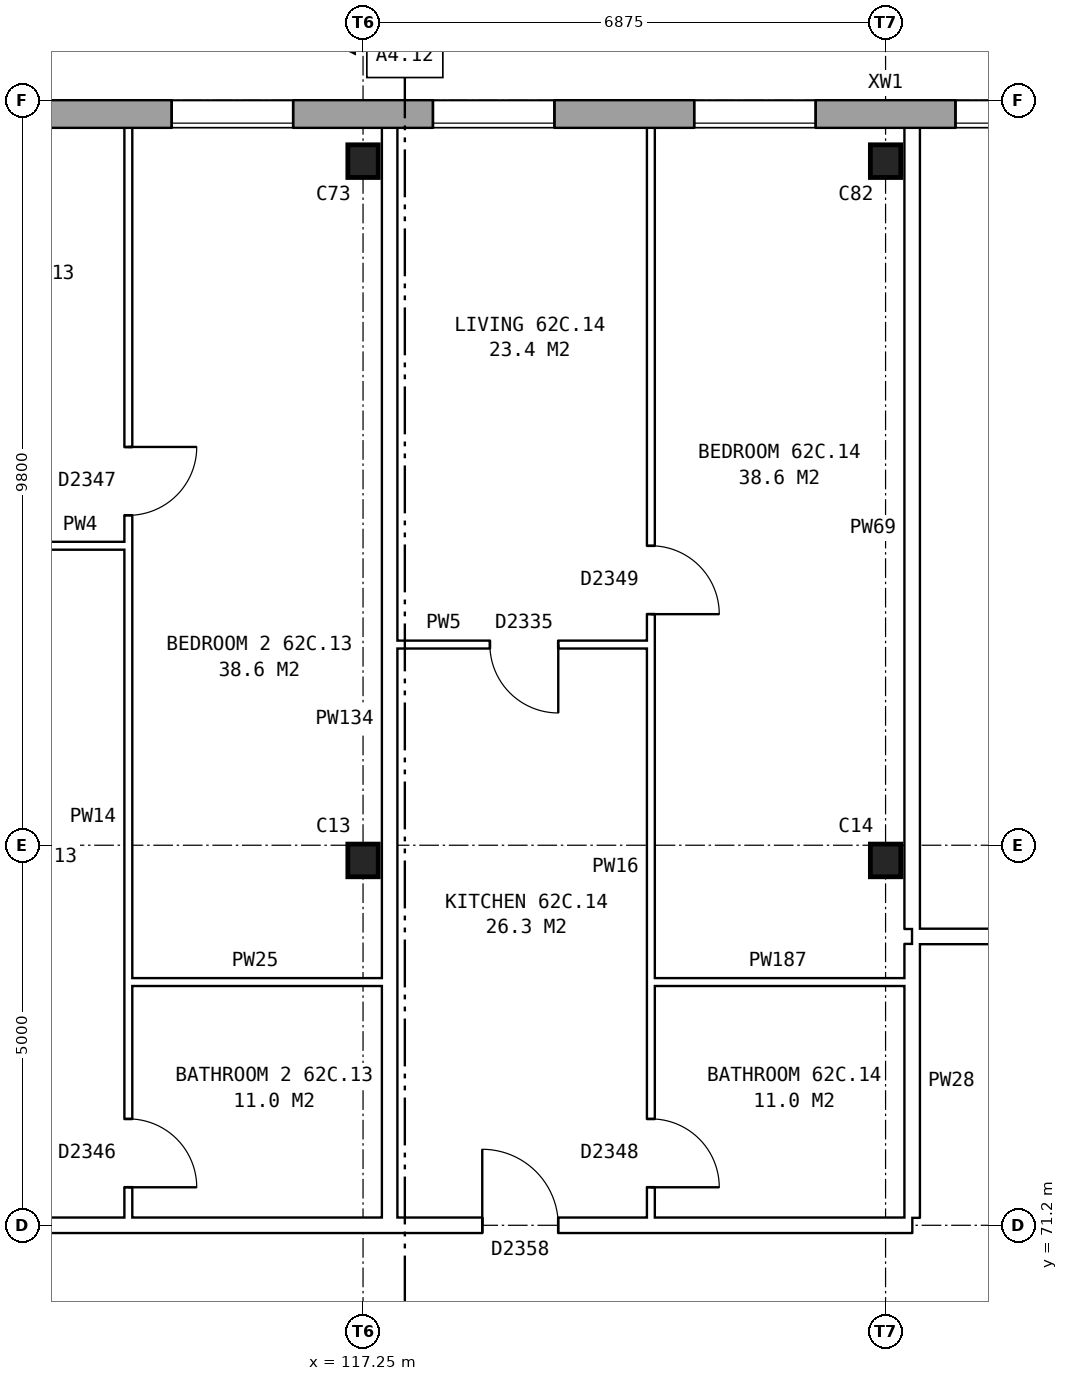
"""IFC4 building model, lengths in metres.
Left out: names, types, materials, properties, quantities, classifications, styles, units other than length and angle.
Written with IfcOpenShell. Run it as: python <this file> out.ifc"""

import sys

from ifc_helpers import new_model, si_unit, direction, frame, frame_2d, origin, origin_2d, place, context, subcontext, project, spatial, rectangle, i_section, extrude, element, fill, save


model = new_model("IFC4")
c1 = context("Model", 3, precision=1e-05, world=origin(), true_north=direction((0.0, 1.0)))
c2 = subcontext(c1, "Body", "Model", "MODEL_VIEW")
j1 = project(units=[si_unit("LENGTHUNIT", "METRE"), si_unit("PLANEANGLEUNIT", "RADIAN")], contexts=[c1])
p1 = place(None, origin())
s1 = spatial("IfcSite", under=j1, at=p1, CompositionType="ELEMENT")
p2 = place(p1, origin())
s2 = spatial("IfcBuilding", under=s1, at=p2, CompositionType="ELEMENT")
p3 = place(p2, frame((0.0, 0.0, 221.4)))
s3 = spatial("IfcBuildingStorey", under=s2, at=p3, CompositionType="ELEMENT", Elevation=221.4)
for number, where, z_axis, x_axis in (
    (1, (117.25, 76.0, 0.0), (0.0, 0.0, 1.0), (1.0, 0.0, 0.0)),
    (2, (124.125, 76.0, 0.0), (0.0, 0.0, 1.0), (1.0, 0.0, 0.0)),
    (3, (117.25, 85.2, 0.0), (0.0, 0.0, 1.0), (1.0, 0.0, 0.0)),
    (4, (124.125, 85.2, 0.0), (0.0, 0.0, 1.0), (1.0, 0.0, 0.0)),
):
    element("IfcColumn", number, at=place(p3, frame(where, z_axis=z_axis, x_axis=x_axis)), inside=s3, PredefinedType="COLUMN", context=c2, shape_type="SweptSolid", body=[
        extrude(i_section(OverallWidth=0.4, OverallDepth=0.43, WebThickness=0.04, FlangeThickness=0.04, at=origin_2d()), origin(), (0.0, 0.0, 1.0), 2.85),
    ])
p4 = place(p3, frame((131.05, 85.82, 0.0), z_axis=(0.0, 0.0, 1.0), x_axis=(-1.0, 0.0, 0.0)))
e5 = element("IfcWall", 5, at=p4, inside=s3, PredefinedType="STANDARD", context=c2, shape_type="SweptSolid", body=[
    extrude(rectangle(XDim=55.1, YDim=0.36, at=frame_2d((27.55, 0.0))), origin(), (0.0, 0.0, 1.0), 2.85),
])
p5 = place(p4, frame((0.969, 0.0, 0.8)))
e6 = element("IfcOpeningElement", 6, at=p5, cuts=e5, PredefinedType="OPENING", context=c2, shape_type="SweptSolid", body=[
    extrude(rectangle(XDim=1.6, YDim=1.8, at=frame_2d((0.8, 0.9))), frame((0.0, 0.19, 0.0), z_axis=(0.0, -1.0, 0.0), x_axis=(1.0, 0.0, 0.0)), (0.0, 0.0, 1.0), 0.38),
])
p6 = place(p4, frame((4.406, 0.0, 0.8)))
e7 = element("IfcOpeningElement", 7, at=p6, cuts=e5, PredefinedType="OPENING", context=c2, shape_type="SweptSolid", body=[
    extrude(rectangle(XDim=1.6, YDim=1.8, at=frame_2d((0.8, 0.9))), frame((0.0, 0.19, 0.0), z_axis=(0.0, -1.0, 0.0), x_axis=(1.0, 0.0, 0.0)), (0.0, 0.0, 1.0), 0.38),
])
p7 = place(p4, frame((7.844, 0.0, 0.8)))
e8 = element("IfcOpeningElement", 8, at=p7, cuts=e5, PredefinedType="OPENING", context=c2, shape_type="SweptSolid", body=[
    extrude(rectangle(XDim=1.6, YDim=1.8, at=frame_2d((0.8, 0.9))), frame((0.0, 0.19, 0.0), z_axis=(0.0, -1.0, 0.0), x_axis=(1.0, 0.0, 0.0)), (0.0, 0.0, 1.0), 0.38),
])
p8 = place(p4, frame((11.281, 0.0, 0.8)))
e9 = element("IfcOpeningElement", 9, at=p8, cuts=e5, PredefinedType="OPENING", context=c2, shape_type="SweptSolid", body=[
    extrude(rectangle(XDim=1.6, YDim=1.8, at=frame_2d((0.8, 0.9))), frame((0.0, 0.19, 0.0), z_axis=(0.0, -1.0, 0.0), x_axis=(1.0, 0.0, 0.0)), (0.0, 0.0, 1.0), 0.38),
])
p9 = place(p4, frame((14.719, 0.0, 0.8)))
e10 = element("IfcOpeningElement", 10, at=p9, cuts=e5, PredefinedType="OPENING", context=c2, shape_type="SweptSolid", body=[
    extrude(rectangle(XDim=1.6, YDim=1.8, at=frame_2d((0.8, 0.9))), frame((0.0, 0.19, 0.0), z_axis=(0.0, -1.0, 0.0), x_axis=(1.0, 0.0, 0.0)), (0.0, 0.0, 1.0), 0.38),
])
p10 = place(p4, frame((18.156, 0.0, 0.8)))
e11 = element("IfcOpeningElement", 11, at=p10, cuts=e5, PredefinedType="OPENING", context=c2, shape_type="SweptSolid", body=[
    extrude(rectangle(XDim=1.6, YDim=1.8, at=frame_2d((0.8, 0.9))), frame((0.0, 0.19, 0.0), z_axis=(0.0, -1.0, 0.0), x_axis=(1.0, 0.0, 0.0)), (0.0, 0.0, 1.0), 0.38),
])
p11 = place(p4, frame((21.594, 0.0, 0.8)))
e12 = element("IfcOpeningElement", 12, at=p11, cuts=e5, PredefinedType="OPENING", context=c2, shape_type="SweptSolid", body=[
    extrude(rectangle(XDim=1.6, YDim=1.8, at=frame_2d((0.8, 0.9))), frame((0.0, 0.19, 0.0), z_axis=(0.0, -1.0, 0.0), x_axis=(1.0, 0.0, 0.0)), (0.0, 0.0, 1.0), 0.38),
])
p12 = place(p4, frame((25.031, 0.0, 0.8)))
e13 = element("IfcOpeningElement", 13, at=p12, cuts=e5, PredefinedType="OPENING", context=c2, shape_type="SweptSolid", body=[
    extrude(rectangle(XDim=1.6, YDim=1.8, at=frame_2d((0.8, 0.9))), frame((0.0, 0.19, 0.0), z_axis=(0.0, -1.0, 0.0), x_axis=(1.0, 0.0, 0.0)), (0.0, 0.0, 1.0), 0.38),
])
p13 = place(p4, frame((28.469, 0.0, 0.8)))
e14 = element("IfcOpeningElement", 14, at=p13, cuts=e5, PredefinedType="OPENING", context=c2, shape_type="SweptSolid", body=[
    extrude(rectangle(XDim=1.6, YDim=1.8, at=frame_2d((0.8, 0.9))), frame((0.0, 0.19, 0.0), z_axis=(0.0, -1.0, 0.0), x_axis=(1.0, 0.0, 0.0)), (0.0, 0.0, 1.0), 0.38),
])
p14 = place(p4, frame((31.906, 0.0, 0.8)))
e15 = element("IfcOpeningElement", 15, at=p14, cuts=e5, PredefinedType="OPENING", context=c2, shape_type="SweptSolid", body=[
    extrude(rectangle(XDim=1.6, YDim=1.8, at=frame_2d((0.8, 0.9))), frame((0.0, 0.19, 0.0), z_axis=(0.0, -1.0, 0.0), x_axis=(1.0, 0.0, 0.0)), (0.0, 0.0, 1.0), 0.38),
])
p15 = place(p4, frame((35.344, 0.0, 0.8)))
e16 = element("IfcOpeningElement", 16, at=p15, cuts=e5, PredefinedType="OPENING", context=c2, shape_type="SweptSolid", body=[
    extrude(rectangle(XDim=1.6, YDim=1.8, at=frame_2d((0.8, 0.9))), frame((0.0, 0.19, 0.0), z_axis=(0.0, -1.0, 0.0), x_axis=(1.0, 0.0, 0.0)), (0.0, 0.0, 1.0), 0.38),
])
p16 = place(p4, frame((38.781, 0.0, 0.8)))
e17 = element("IfcOpeningElement", 17, at=p16, cuts=e5, PredefinedType="OPENING", context=c2, shape_type="SweptSolid", body=[
    extrude(rectangle(XDim=1.6, YDim=1.8, at=frame_2d((0.8, 0.9))), frame((0.0, 0.19, 0.0), z_axis=(0.0, -1.0, 0.0), x_axis=(1.0, 0.0, 0.0)), (0.0, 0.0, 1.0), 0.38),
])
p17 = place(p4, frame((42.219, 0.0, 0.8)))
e18 = element("IfcOpeningElement", 18, at=p17, cuts=e5, PredefinedType="OPENING", context=c2, shape_type="SweptSolid", body=[
    extrude(rectangle(XDim=1.6, YDim=1.8, at=frame_2d((0.8, 0.9))), frame((0.0, 0.19, 0.0), z_axis=(0.0, -1.0, 0.0), x_axis=(1.0, 0.0, 0.0)), (0.0, 0.0, 1.0), 0.38),
])
p18 = place(p4, frame((45.656, 0.0, 0.8)))
e19 = element("IfcOpeningElement", 19, at=p18, cuts=e5, PredefinedType="OPENING", context=c2, shape_type="SweptSolid", body=[
    extrude(rectangle(XDim=1.6, YDim=1.8, at=frame_2d((0.8, 0.9))), frame((0.0, 0.19, 0.0), z_axis=(0.0, -1.0, 0.0), x_axis=(1.0, 0.0, 0.0)), (0.0, 0.0, 1.0), 0.38),
])
p19 = place(p4, frame((49.094, 0.0, 0.8)))
e20 = element("IfcOpeningElement", 20, at=p19, cuts=e5, PredefinedType="OPENING", context=c2, shape_type="SweptSolid", body=[
    extrude(rectangle(XDim=1.6, YDim=1.8, at=frame_2d((0.8, 0.9))), frame((0.0, 0.19, 0.0), z_axis=(0.0, -1.0, 0.0), x_axis=(1.0, 0.0, 0.0)), (0.0, 0.0, 1.0), 0.38),
])
p20 = place(p4, frame((52.531, 0.0, 0.8)))
e21 = element("IfcOpeningElement", 21, at=p20, cuts=e5, PredefinedType="OPENING", context=c2, shape_type="SweptSolid", body=[
    extrude(rectangle(XDim=1.6, YDim=1.8, at=frame_2d((0.8, 0.9))), frame((0.0, 0.19, 0.0), z_axis=(0.0, -1.0, 0.0), x_axis=(1.0, 0.0, 0.0)), (0.0, 0.0, 1.0), 0.38),
])
p21 = place(p3, frame((83.225, 71.2, 0.0), z_axis=(0.0, 0.0, 1.0), x_axis=(1.0, 0.0, 0.0)))
e22 = element("IfcWall", 22, at=p21, inside=s3, PredefinedType="PARTITIONING", context=c2, shape_type="SweptSolid", body=[
    extrude(rectangle(XDim=41.25, YDim=0.2, at=frame_2d((20.625, 0.0))), origin(), (0.0, 0.0, 1.0), 2.85),
])
p22 = place(p21, frame((4.656, 0.0, 0.0)))
e23 = element("IfcOpeningElement", 23, at=p22, cuts=e22, PredefinedType="OPENING", context=c2, shape_type="SweptSolid", body=[
    extrude(rectangle(XDim=1.0, YDim=2.1, at=frame_2d((0.5, 1.05))), frame((0.0, 0.11, 0.0), z_axis=(0.0, -1.0, 0.0), x_axis=(1.0, 0.0, 0.0)), (0.0, 0.0, 1.0), 0.22),
])
p23 = place(p21, frame((11.531, 0.0, 0.0)))
e24 = element("IfcOpeningElement", 24, at=p23, cuts=e22, PredefinedType="OPENING", context=c2, shape_type="SweptSolid", body=[
    extrude(rectangle(XDim=1.0, YDim=2.1, at=frame_2d((0.5, 1.05))), frame((0.0, 0.11, 0.0), z_axis=(0.0, -1.0, 0.0), x_axis=(1.0, 0.0, 0.0)), (0.0, 0.0, 1.0), 0.22),
])
p24 = place(p21, frame((18.406, 0.0, 0.0)))
e25 = element("IfcOpeningElement", 25, at=p24, cuts=e22, PredefinedType="OPENING", context=c2, shape_type="SweptSolid", body=[
    extrude(rectangle(XDim=1.0, YDim=2.1, at=frame_2d((0.5, 1.05))), frame((0.0, 0.11, 0.0), z_axis=(0.0, -1.0, 0.0), x_axis=(1.0, 0.0, 0.0)), (0.0, 0.0, 1.0), 0.22),
])
p25 = place(p21, frame((28.719, 0.0, 0.0)))
e26 = element("IfcOpeningElement", 26, at=p25, cuts=e22, PredefinedType="OPENING", context=c2, shape_type="SweptSolid", body=[
    extrude(rectangle(XDim=1.0, YDim=2.1, at=frame_2d((0.5, 1.05))), frame((0.0, 0.11, 0.0), z_axis=(0.0, -1.0, 0.0), x_axis=(1.0, 0.0, 0.0)), (0.0, 0.0, 1.0), 0.22),
])
p26 = place(p21, frame((35.594, 0.0, 0.0)))
e27 = element("IfcOpeningElement", 27, at=p26, cuts=e22, PredefinedType="OPENING", context=c2, shape_type="SweptSolid", body=[
    extrude(rectangle(XDim=1.0, YDim=2.1, at=frame_2d((0.5, 1.05))), frame((0.0, 0.11, 0.0), z_axis=(0.0, -1.0, 0.0), x_axis=(1.0, 0.0, 0.0)), (0.0, 0.0, 1.0), 0.22),
])
for number, where, z_axis, x_axis in (
    (28, (114.162, 74.4, 0.0), (0.0, 0.0, 1.0), (1.0, 0.0, 0.0)),
    (29, (121.037, 74.4, 0.0), (0.0, 0.0, 1.0), (1.0, 0.0, 0.0)),
):
    element("IfcWall", number, at=place(p3, frame(where, z_axis=z_axis, x_axis=x_axis)), inside=s3, PredefinedType="PARTITIONING", context=c2, shape_type="SweptSolid", body=[
        extrude(rectangle(XDim=3.338, YDim=0.1, at=frame_2d((1.669, 0.0))), origin(), (0.0, 0.0, 1.0), 2.85),
    ])
p27 = place(p3, frame((124.475, 75.0, 0.0), z_axis=(0.0, 0.0, 1.0), x_axis=(1.0, 0.0, 0.0)))
e30 = element("IfcWall", 30, at=p27, inside=s3, PredefinedType="PARTITIONING", context=c2, shape_type="SweptSolid", body=[
    extrude(rectangle(XDim=6.885, YDim=0.2, at=frame_2d((3.442, 0.0))), origin(), (0.0, 0.0, 1.0), 2.85),
])
p28 = place(p27, frame((2.992, 0.0, 0.0)))
e31 = element("IfcOpeningElement", 31, at=p28, cuts=e30, PredefinedType="OPENING", context=c2, shape_type="SweptSolid", body=[
    extrude(rectangle(XDim=0.9, YDim=2.1, at=frame_2d((0.45, 1.05))), frame((0.0, 0.11, 0.0), z_axis=(0.0, -1.0, 0.0), x_axis=(1.0, 0.0, 0.0)), (0.0, 0.0, 1.0), 0.22),
])
p29 = place(p3, frame((117.7, 78.84, 0.0), z_axis=(0.0, 0.0, 1.0), x_axis=(1.0, 0.0, 0.0)))
e32 = element("IfcWall", 32, at=p29, inside=s3, PredefinedType="PARTITIONING", context=c2, shape_type="SweptSolid", body=[
    extrude(rectangle(XDim=3.337, YDim=0.1, at=frame_2d((1.668, 0.0))), origin(), (0.0, 0.0, 1.0), 2.85),
])
p30 = place(p29, frame((1.219, 0.0, 0.0)))
e33 = element("IfcOpeningElement", 33, at=p30, cuts=e32, PredefinedType="OPENING", context=c2, shape_type="SweptSolid", body=[
    extrude(rectangle(XDim=0.9, YDim=2.1, at=frame_2d((0.45, 1.05))), frame((0.0, 0.06, 0.0), z_axis=(0.0, -1.0, 0.0), x_axis=(1.0, 0.0, 0.0)), (0.0, 0.0, 1.0), 0.12),
])
p31 = place(p3, frame((110.725, 80.14, 0.0), z_axis=(0.0, 0.0, 1.0), x_axis=(1.0, 0.0, 0.0)))
e34 = element("IfcWall", 34, at=p31, inside=s3, PredefinedType="PARTITIONING", context=c2, shape_type="SweptSolid", body=[
    extrude(rectangle(XDim=3.437, YDim=0.1, at=frame_2d((1.719, 0.0))), origin(), (0.0, 0.0, 1.0), 2.85),
])
p32 = place(p31, frame((1.269, 0.0, 0.0)))
e35 = element("IfcOpeningElement", 35, at=p32, cuts=e34, PredefinedType="OPENING", context=c2, shape_type="SweptSolid", body=[
    extrude(rectangle(XDim=0.9, YDim=2.1, at=frame_2d((0.45, 1.05))), frame((0.0, 0.06, 0.0), z_axis=(0.0, -1.0, 0.0), x_axis=(1.0, 0.0, 0.0)), (0.0, 0.0, 1.0), 0.12),
])
p33 = place(p3, frame((114.162, 71.3, 0.0), z_axis=(0.0, 0.0, 1.0), x_axis=(0.0, 1.0, 0.0)))
e36 = element("IfcWall", 36, at=p33, inside=s3, PredefinedType="PARTITIONING", context=c2, shape_type="SweptSolid", body=[
    extrude(rectangle(XDim=14.34, YDim=0.1, at=frame_2d((7.17, 0.0))), origin(), (0.0, 0.0, 1.0), 2.85),
])
p34 = place(p33, frame((9.24, 0.0, 0.0)))
e37 = element("IfcOpeningElement", 37, at=p34, cuts=e36, PredefinedType="OPENING", context=c2, shape_type="SweptSolid", body=[
    extrude(rectangle(XDim=0.9, YDim=2.1, at=frame_2d((0.45, 1.05))), frame((0.0, 0.06, 0.0), z_axis=(0.0, -1.0, 0.0), x_axis=(1.0, 0.0, 0.0)), (0.0, 0.0, 1.0), 0.12),
])
p35 = place(p33, frame((0.4, 0.0, 0.0)))
e38 = element("IfcOpeningElement", 38, at=p35, cuts=e36, PredefinedType="OPENING", context=c2, shape_type="SweptSolid", body=[
    extrude(rectangle(XDim=0.9, YDim=2.1, at=frame_2d((0.45, 1.05))), frame((0.0, 0.06, 0.0), z_axis=(0.0, -1.0, 0.0), x_axis=(1.0, 0.0, 0.0)), (0.0, 0.0, 1.0), 0.12),
])
p36 = place(p3, frame((117.6, 71.3, 0.0), z_axis=(0.0, 0.0, 1.0), x_axis=(0.0, 1.0, 0.0)))
e39 = element("IfcWall", 39, at=p36, inside=s3, PredefinedType="PARTITIONING", context=c2, shape_type="SweptSolid", body=[
    extrude(rectangle(XDim=14.34, YDim=0.2, at=frame_2d((7.17, 0.0))), origin(), (0.0, 0.0, 1.0), 2.85),
])
p37 = place(p3, frame((121.037, 71.3, 0.0), z_axis=(0.0, 0.0, 1.0), x_axis=(0.0, 1.0, 0.0)))
e40 = element("IfcWall", 40, at=p37, inside=s3, PredefinedType="PARTITIONING", context=c2, shape_type="SweptSolid", body=[
    extrude(rectangle(XDim=14.34, YDim=0.1, at=frame_2d((7.17, 0.0))), origin(), (0.0, 0.0, 1.0), 2.85),
])
p38 = place(p37, frame((7.94, 0.0, 0.0)))
e41 = element("IfcOpeningElement", 41, at=p38, cuts=e40, PredefinedType="OPENING", context=c2, shape_type="SweptSolid", body=[
    extrude(rectangle(XDim=0.9, YDim=2.1, at=frame_2d((0.45, 1.05))), frame((0.0, 0.06, 0.0), z_axis=(0.0, -1.0, 0.0), x_axis=(1.0, 0.0, 0.0)), (0.0, 0.0, 1.0), 0.12),
])
p39 = place(p37, frame((0.4, 0.0, 0.0)))
e42 = element("IfcOpeningElement", 42, at=p39, cuts=e40, PredefinedType="OPENING", context=c2, shape_type="SweptSolid", body=[
    extrude(rectangle(XDim=0.9, YDim=2.1, at=frame_2d((0.45, 1.05))), frame((0.0, 0.06, 0.0), z_axis=(0.0, -1.0, 0.0), x_axis=(1.0, 0.0, 0.0)), (0.0, 0.0, 1.0), 0.12),
])
p40 = place(p3, frame((124.475, 71.3, 0.0), z_axis=(0.0, 0.0, 1.0), x_axis=(0.0, 1.0, 0.0)))
e43 = element("IfcWall", 43, at=p40, inside=s3, PredefinedType="PARTITIONING", context=c2, shape_type="SweptSolid", body=[
    extrude(rectangle(XDim=3.6, YDim=0.2, at=frame_2d((1.8, 0.0))), origin(), (0.0, 0.0, 1.0), 2.85),
])
p41 = place(p3, frame((124.475, 75.1, 0.0), z_axis=(0.0, 0.0, 1.0), x_axis=(0.0, 1.0, 0.0)))
e44 = element("IfcWall", 44, at=p41, inside=s3, PredefinedType="PARTITIONING", context=c2, shape_type="SweptSolid", body=[
    extrude(rectangle(XDim=10.54, YDim=0.2, at=frame_2d((5.27, 0.0))), origin(), (0.0, 0.0, 1.0), 2.85),
])
p42 = place(p6, origin())
e45 = element("IfcWindow", 45, at=p42, inside=s3, PartitioningType="SINGLE_PANEL", PredefinedType="WINDOW", context=c2, shape_type="SweptSolid", body=[
    extrude(rectangle(XDim=1.6, YDim=1.8, at=frame_2d((0.8, 0.9))), frame((0.0, 0.15, 0.0), z_axis=(0.0, -1.0, 0.0), x_axis=(1.0, 0.0, 0.0)), (0.0, 0.0, 1.0), 0.06),
])
fill(e7, e45)
p43 = place(p7, origin())
e46 = element("IfcWindow", 46, at=p43, inside=s3, PartitioningType="SINGLE_PANEL", PredefinedType="WINDOW", context=c2, shape_type="SweptSolid", body=[
    extrude(rectangle(XDim=1.6, YDim=1.8, at=frame_2d((0.8, 0.9))), frame((0.0, 0.15, 0.0), z_axis=(0.0, -1.0, 0.0), x_axis=(1.0, 0.0, 0.0)), (0.0, 0.0, 1.0), 0.06),
])
fill(e8, e46)
p44 = place(p8, origin())
e47 = element("IfcWindow", 47, at=p44, inside=s3, PartitioningType="SINGLE_PANEL", PredefinedType="WINDOW", context=c2, shape_type="SweptSolid", body=[
    extrude(rectangle(XDim=1.6, YDim=1.8, at=frame_2d((0.8, 0.9))), frame((0.0, 0.15, 0.0), z_axis=(0.0, -1.0, 0.0), x_axis=(1.0, 0.0, 0.0)), (0.0, 0.0, 1.0), 0.06),
])
fill(e9, e47)
p45 = place(p9, origin())
e48 = element("IfcWindow", 48, at=p45, inside=s3, PartitioningType="SINGLE_PANEL", PredefinedType="WINDOW", context=c2, shape_type="SweptSolid", body=[
    extrude(rectangle(XDim=1.6, YDim=1.8, at=frame_2d((0.8, 0.9))), frame((0.0, 0.15, 0.0), z_axis=(0.0, -1.0, 0.0), x_axis=(1.0, 0.0, 0.0)), (0.0, 0.0, 1.0), 0.06),
])
fill(e10, e48)
p46 = place(p34, frame((0.9, 0.0, 0.0), z_axis=(0.0, 0.0, 1.0), x_axis=(-1.0, 0.0, 0.0)))
e49 = element("IfcDoor", 49, at=p46, inside=s3, OperationType="SINGLE_SWING_LEFT", PredefinedType="DOOR", context=c2, shape_type="SweptSolid", body=[
    extrude(rectangle(XDim=0.9, YDim=2.1, at=frame_2d((0.45, 1.05))), frame((0.0, 0.025, 0.0), z_axis=(0.0, -1.0, 0.0), x_axis=(1.0, 0.0, 0.0)), (0.0, 0.0, 1.0), 0.05),
])
fill(e37, e49)
p47 = place(p35, frame((0.9, 0.0, 0.0), z_axis=(0.0, 0.0, 1.0), x_axis=(-1.0, 0.0, 0.0)))
e50 = element("IfcDoor", 50, at=p47, inside=s3, OperationType="SINGLE_SWING_RIGHT", PredefinedType="DOOR", context=c2, shape_type="SweptSolid", body=[
    extrude(rectangle(XDim=0.9, YDim=2.1, at=frame_2d((0.45, 1.05))), frame((0.0, 0.025, 0.0), z_axis=(0.0, -1.0, 0.0), x_axis=(1.0, 0.0, 0.0)), (0.0, 0.0, 1.0), 0.05),
])
fill(e38, e50)
p48 = place(p38, frame((0.9, 0.0, 0.0), z_axis=(0.0, 0.0, 1.0), x_axis=(-1.0, 0.0, 0.0)))
e51 = element("IfcDoor", 51, at=p48, inside=s3, OperationType="SINGLE_SWING_RIGHT", PredefinedType="DOOR", context=c2, shape_type="SweptSolid", body=[
    extrude(rectangle(XDim=0.9, YDim=2.1, at=frame_2d((0.45, 1.05))), frame((0.0, 0.025, 0.0), z_axis=(0.0, -1.0, 0.0), x_axis=(1.0, 0.0, 0.0)), (0.0, 0.0, 1.0), 0.05),
])
fill(e41, e51)
p49 = place(p26, origin())
e52 = element("IfcDoor", 52, at=p49, inside=s3, OperationType="SINGLE_SWING_LEFT", PredefinedType="DOOR", context=c2, shape_type="SweptSolid", body=[
    extrude(rectangle(XDim=1.0, YDim=2.1, at=frame_2d((0.5, 1.05))), frame((0.0, 0.025, 0.0), z_axis=(0.0, -1.0, 0.0), x_axis=(1.0, 0.0, 0.0)), (0.0, 0.0, 1.0), 0.05),
])
fill(e27, e52)
p50 = place(p30, frame((0.9, 0.0, 0.0), z_axis=(0.0, 0.0, 1.0), x_axis=(-1.0, 0.0, 0.0)))
e53 = element("IfcDoor", 53, at=p50, inside=s3, OperationType="SINGLE_SWING_LEFT", PredefinedType="DOOR", context=c2, shape_type="SweptSolid", body=[
    extrude(rectangle(XDim=0.9, YDim=2.1, at=frame_2d((0.45, 1.05))), frame((0.0, 0.025, 0.0), z_axis=(0.0, -1.0, 0.0), x_axis=(1.0, 0.0, 0.0)), (0.0, 0.0, 1.0), 0.05),
])
fill(e33, e53)
p51 = place(p39, frame((0.9, 0.0, 0.0), z_axis=(0.0, 0.0, 1.0), x_axis=(-1.0, 0.0, 0.0)))
e54 = element("IfcDoor", 54, at=p51, inside=s3, OperationType="SINGLE_SWING_RIGHT", PredefinedType="DOOR", context=c2, shape_type="SweptSolid", body=[
    extrude(rectangle(XDim=0.9, YDim=2.1, at=frame_2d((0.45, 1.05))), frame((0.0, 0.025, 0.0), z_axis=(0.0, -1.0, 0.0), x_axis=(1.0, 0.0, 0.0)), (0.0, 0.0, 1.0), 0.05),
])
fill(e42, e54)
save(model, sys.argv[1])
